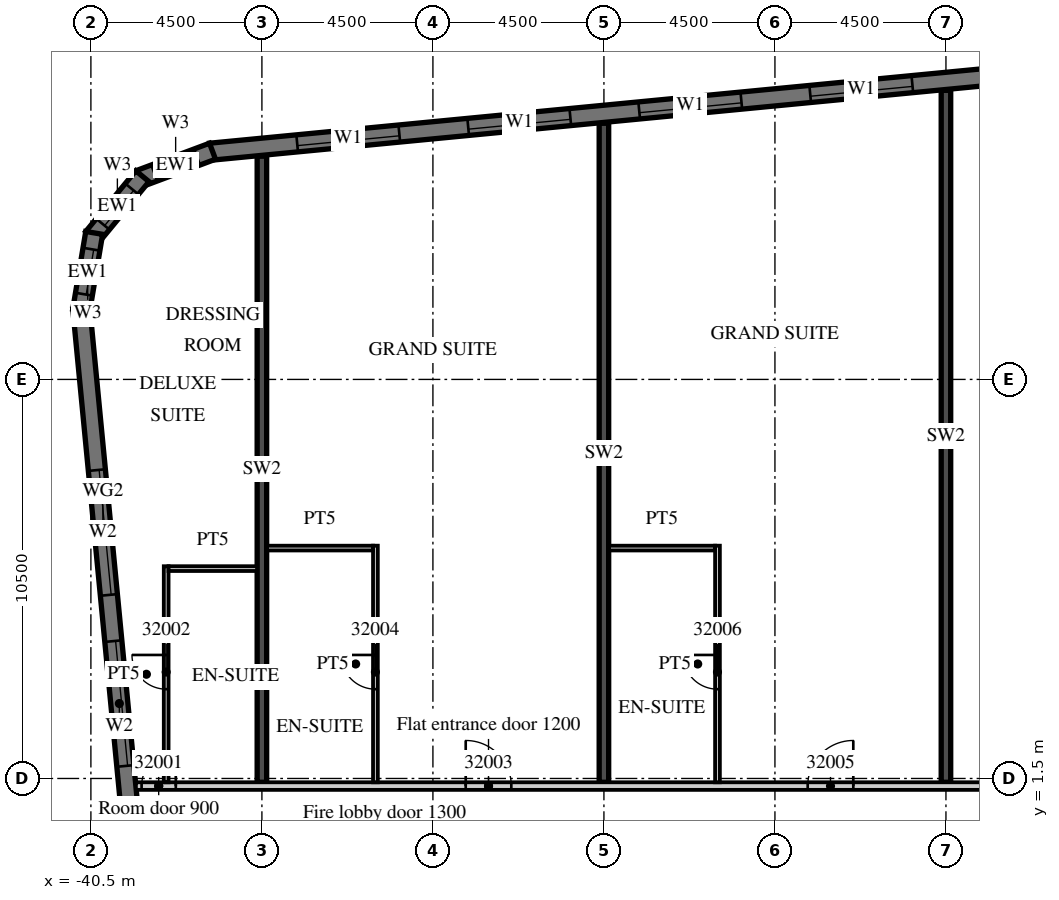
"""IFC4 building model, lengths in metres.
Left out: names, types, materials, properties, quantities, classifications, styles, units other than length and angle.
Written with IfcOpenShell. Run it as: python <this file> out.ifc"""

import sys

from ifc_helpers import new_model, si_unit, direction, frame, frame_2d, origin, place, context, subcontext, project, spatial, polyline, rectangle, outline, extrude, element, fill, save


model = new_model("IFC4")
c1 = context("Model", 3, precision=1e-05, world=origin(), true_north=direction((0.0, 1.0)))
c2 = subcontext(c1, "Body", "Model", "MODEL_VIEW")
j1 = project(units=[si_unit("LENGTHUNIT", "METRE"), si_unit("PLANEANGLEUNIT", "RADIAN")], contexts=[c1])
p1 = place(None, origin())
s1 = spatial("IfcSite", under=j1, at=p1, CompositionType="ELEMENT")
p2 = place(p1, origin())
s2 = spatial("IfcBuilding", under=s1, at=p2, CompositionType="ELEMENT")
p3 = place(p2, frame((0.0, 0.0, 140.5)))
s3 = spatial("IfcBuildingStorey", under=s2, at=p3, CompositionType="ELEMENT", Elevation=140.5)
p4 = place(p3, frame((-36.0, 1.4, 0.0), z_axis=(0.0, 0.0, 1.0), x_axis=(0.0, 1.0, 0.0)))
e1 = element("IfcWall", 1, at=p4, inside=s3, PredefinedType="SHEAR", context=c2, shape_type="SweptSolid", body=[
    extrude(rectangle(XDim=16.474, YDim=0.25, at=frame_2d((8.237, 0.0))), origin(), (0.0, 0.0, 1.0), 3.3),
])
p5 = place(p3, frame((-27.0, 1.4, 0.0), z_axis=(0.0, 0.0, 1.0), x_axis=(0.0, 1.0, 0.0)))
e2 = element("IfcWall", 2, at=p5, inside=s3, PredefinedType="SHEAR", context=c2, shape_type="SweptSolid", body=[
    extrude(rectangle(XDim=17.34, YDim=0.25, at=frame_2d((8.67, 0.0))), origin(), (0.0, 0.0, 1.0), 3.3),
])
p6 = place(p3, frame((-18.0, 1.4, 0.0), z_axis=(0.0, 0.0, 1.0), x_axis=(0.0, 1.0, 0.0)))
e3 = element("IfcWall", 3, at=p6, inside=s3, PredefinedType="SHEAR", context=c2, shape_type="SweptSolid", body=[
    extrude(rectangle(XDim=18.207, YDim=0.25, at=frame_2d((9.104, 0.0))), origin(), (0.0, 0.0, 1.0), 3.3),
])
p7 = place(p3, frame((-40.753, 13.872, 0.0), z_axis=(0.0, 0.0, 1.0), x_axis=(0.095843327381, -0.995396431878, 0.0)))
e4 = element("IfcWall", 4, at=p7, inside=s3, PredefinedType="SOLIDWALL", context=c2, shape_type="SweptSolid", body=[
    extrude(rectangle(XDim=35.0, YDim=0.45, at=frame_2d((17.5, 0.0))), origin(), (0.0, 0.0, 1.0), 3.02),
])
p8 = place(p7, frame((4.277, 0.0, 0.45)))
e5 = element("IfcOpeningElement", 5, at=p8, cuts=e4, PredefinedType="OPENING", context=c2, shape_type="SweptSolid", body=[
    extrude(rectangle(XDim=3.3, YDim=2.25, at=frame_2d((1.65, 1.125))), frame((0.0, 0.235, 0.0), z_axis=(0.0, -1.0, 0.0), x_axis=(1.0, 0.0, 0.0)), (0.0, 0.0, 1.0), 0.47),
])
p9 = place(p7, frame((8.798, 0.0, 0.45)))
e6 = element("IfcOpeningElement", 6, at=p9, cuts=e4, PredefinedType="OPENING", context=c2, shape_type="SweptSolid", body=[
    extrude(rectangle(XDim=3.3, YDim=2.25, at=frame_2d((1.65, 1.125))), frame((0.0, 0.235, 0.0), z_axis=(0.0, -1.0, 0.0), x_axis=(1.0, 0.0, 0.0)), (0.0, 0.0, 1.0), 0.47),
])
p10 = place(p3, frame((13.521, 22.89, 0.0), z_axis=(0.0, 0.0, 1.0), x_axis=(-0.995396445054, -0.095843190545, 0.0)))
e7 = element("IfcWall", 7, at=p10, inside=s3, PredefinedType="SOLIDWALL", context=c2, shape_type="SweptSolid", body=[
    extrude(rectangle(XDim=51.114, YDim=0.45, at=frame_2d((25.557, 0.0))), origin(), (0.0, 0.0, 1.0), 3.02),
])
p11 = place(p10, frame((0.91, 0.0, 0.45)))
e8 = element("IfcOpeningElement", 8, at=p11, cuts=e7, PredefinedType="OPENING", context=c2, shape_type="SweptSolid", body=[
    extrude(rectangle(XDim=2.7, YDim=2.25, at=frame_2d((1.35, 1.125))), frame((0.0, 0.235, 0.0), z_axis=(0.0, -1.0, 0.0), x_axis=(1.0, 0.0, 0.0)), (0.0, 0.0, 1.0), 0.47),
])
p12 = place(p10, frame((5.431, 0.0, 0.45)))
e9 = element("IfcOpeningElement", 9, at=p12, cuts=e7, PredefinedType="OPENING", context=c2, shape_type="SweptSolid", body=[
    extrude(rectangle(XDim=2.7, YDim=2.25, at=frame_2d((1.35, 1.125))), frame((0.0, 0.235, 0.0), z_axis=(0.0, -1.0, 0.0), x_axis=(1.0, 0.0, 0.0)), (0.0, 0.0, 1.0), 0.47),
])
p13 = place(p10, frame((9.952, 0.0, 0.45)))
e10 = element("IfcOpeningElement", 10, at=p13, cuts=e7, PredefinedType="OPENING", context=c2, shape_type="SweptSolid", body=[
    extrude(rectangle(XDim=2.7, YDim=2.25, at=frame_2d((1.35, 1.125))), frame((0.0, 0.235, 0.0), z_axis=(0.0, -1.0, 0.0), x_axis=(1.0, 0.0, 0.0)), (0.0, 0.0, 1.0), 0.47),
])
p14 = place(p10, frame((14.473, 0.0, 0.45)))
e11 = element("IfcOpeningElement", 11, at=p14, cuts=e7, PredefinedType="OPENING", context=c2, shape_type="SweptSolid", body=[
    extrude(rectangle(XDim=2.7, YDim=2.25, at=frame_2d((1.35, 1.125))), frame((0.0, 0.235, 0.0), z_axis=(0.0, -1.0, 0.0), x_axis=(1.0, 0.0, 0.0)), (0.0, 0.0, 1.0), 0.47),
])
p15 = place(p10, frame((18.994, 0.0, 0.45)))
e12 = element("IfcOpeningElement", 12, at=p15, cuts=e7, PredefinedType="OPENING", context=c2, shape_type="SweptSolid", body=[
    extrude(rectangle(XDim=2.7, YDim=2.25, at=frame_2d((1.35, 1.125))), frame((0.0, 0.235, 0.0), z_axis=(0.0, -1.0, 0.0), x_axis=(1.0, 0.0, 0.0)), (0.0, 0.0, 1.0), 0.47),
])
p16 = place(p10, frame((23.514, 0.0, 0.45)))
e13 = element("IfcOpeningElement", 13, at=p16, cuts=e7, PredefinedType="OPENING", context=c2, shape_type="SweptSolid", body=[
    extrude(rectangle(XDim=2.7, YDim=2.25, at=frame_2d((1.35, 1.125))), frame((0.0, 0.235, 0.0), z_axis=(0.0, -1.0, 0.0), x_axis=(1.0, 0.0, 0.0)), (0.0, 0.0, 1.0), 0.47),
])
p17 = place(p10, frame((28.035, 0.0, 0.45)))
e14 = element("IfcOpeningElement", 14, at=p17, cuts=e7, PredefinedType="OPENING", context=c2, shape_type="SweptSolid", body=[
    extrude(rectangle(XDim=2.7, YDim=2.25, at=frame_2d((1.35, 1.125))), frame((0.0, 0.235, 0.0), z_axis=(0.0, -1.0, 0.0), x_axis=(1.0, 0.0, 0.0)), (0.0, 0.0, 1.0), 0.47),
])
p18 = place(p10, frame((32.556, 0.0, 0.45)))
e15 = element("IfcOpeningElement", 15, at=p18, cuts=e7, PredefinedType="OPENING", context=c2, shape_type="SweptSolid", body=[
    extrude(rectangle(XDim=2.7, YDim=2.25, at=frame_2d((1.35, 1.125))), frame((0.0, 0.235, 0.0), z_axis=(0.0, -1.0, 0.0), x_axis=(1.0, 0.0, 0.0)), (0.0, 0.0, 1.0), 0.47),
])
p19 = place(p10, frame((37.077, 0.0, 0.45)))
e16 = element("IfcOpeningElement", 16, at=p19, cuts=e7, PredefinedType="OPENING", context=c2, shape_type="SweptSolid", body=[
    extrude(rectangle(XDim=2.7, YDim=2.25, at=frame_2d((1.35, 1.125))), frame((0.0, 0.235, 0.0), z_axis=(0.0, -1.0, 0.0), x_axis=(1.0, 0.0, 0.0)), (0.0, 0.0, 1.0), 0.47),
])
p20 = place(p10, frame((41.598, 0.0, 0.45)))
e17 = element("IfcOpeningElement", 17, at=p20, cuts=e7, PredefinedType="OPENING", context=c2, shape_type="SweptSolid", body=[
    extrude(rectangle(XDim=2.7, YDim=2.25, at=frame_2d((1.35, 1.125))), frame((0.0, 0.235, 0.0), z_axis=(0.0, -1.0, 0.0), x_axis=(1.0, 0.0, 0.0)), (0.0, 0.0, 1.0), 0.47),
])
p21 = place(p10, frame((46.118, 0.0, 0.45)))
e18 = element("IfcOpeningElement", 18, at=p21, cuts=e7, PredefinedType="OPENING", context=c2, shape_type="SweptSolid", body=[
    extrude(rectangle(XDim=2.7, YDim=2.25, at=frame_2d((1.35, 1.125))), frame((0.0, 0.235, 0.0), z_axis=(0.0, -1.0, 0.0), x_axis=(1.0, 0.0, 0.0)), (0.0, 0.0, 1.0), 0.47),
])
p22 = place(p3, frame((-37.3, 18.004, 0.0), z_axis=(0.0, 0.0, 1.0), x_axis=(-0.936677599948, -0.350192909346, 0.0)))
e19 = element("IfcWall", 19, at=p22, inside=s3, PredefinedType="SOLIDWALL", context=c2, shape_type="SweptSolid", body=[
    extrude(outline(polyline([(0.0, -0.225), (2.071, -0.225), (1.95, 0.225), (0.121, 0.225), (0.0, -0.225)])), origin(), (0.0, 0.0, 1.0), 3.02),
])
p23 = place(p22, frame((0.435, 0.0, 0.45)))
e20 = element("IfcOpeningElement", 20, at=p23, cuts=e19, PredefinedType="OPENING", context=c2, shape_type="SweptSolid", body=[
    extrude(rectangle(XDim=1.2, YDim=2.25, at=frame_2d((0.6, 1.125))), frame((0.0, 0.235, 0.0), z_axis=(0.0, -1.0, 0.0), x_axis=(1.0, 0.0, 0.0)), (0.0, 0.0, 1.0), 0.47),
])
p24 = place(p3, frame((-39.145, 17.347, 0.0), z_axis=(0.0, 0.0, 1.0), x_axis=(-0.636046112757, -0.771651049663, 0.0)))
e21 = element("IfcWall", 21, at=p24, inside=s3, PredefinedType="SOLIDWALL", context=c2, shape_type="SweptSolid", body=[
    extrude(outline(polyline([(0.0, -0.225), (2.071, -0.225), (1.95, 0.225), (0.121, 0.225), (0.0, -0.225)])), origin(), (0.0, 0.0, 1.0), 3.02),
])
p25 = place(p24, frame((0.435, 0.0, 0.45)))
e22 = element("IfcOpeningElement", 22, at=p25, cuts=e21, PredefinedType="OPENING", context=c2, shape_type="SweptSolid", body=[
    extrude(rectangle(XDim=1.2, YDim=2.25, at=frame_2d((0.6, 1.125))), frame((0.0, 0.235, 0.0), z_axis=(0.0, -1.0, 0.0), x_axis=(1.0, 0.0, 0.0)), (0.0, 0.0, 1.0), 0.47),
])
p26 = place(p3, frame((-40.413, 15.855, 0.0), z_axis=(0.0, 0.0, 1.0), x_axis=(-0.165068144653, -0.986282164302, 0.0)))
e23 = element("IfcWall", 23, at=p26, inside=s3, PredefinedType="SOLIDWALL", context=c2, shape_type="SweptSolid", body=[
    extrude(outline(polyline([(0.0, -0.225), (2.071, -0.225), (1.95, 0.225), (0.121, 0.225), (0.0, -0.225)])), origin(), (0.0, 0.0, 1.0), 3.02),
])
p27 = place(p26, frame((0.435, 0.0, 0.45)))
e24 = element("IfcOpeningElement", 24, at=p27, cuts=e23, PredefinedType="OPENING", context=c2, shape_type="SweptSolid", body=[
    extrude(rectangle(XDim=1.2, YDim=2.25, at=frame_2d((0.6, 1.125))), frame((0.0, 0.235, 0.0), z_axis=(0.0, -1.0, 0.0), x_axis=(1.0, 0.0, 0.0)), (0.0, 0.0, 1.0), 0.47),
])
p28 = place(p3, frame((-39.316, 1.3, 0.0), z_axis=(0.0, 0.0, 1.0), x_axis=(1.0, 0.0, 0.0)))
e25 = element("IfcWall", 25, at=p28, inside=s3, PredefinedType="PARTITIONING", context=c2, shape_type="SweptSolid", body=[
    extrude(rectangle(XDim=52.816, YDim=0.2, at=frame_2d((26.408, 0.0))), origin(), (0.0, 0.0, 1.0), 3.02),
])
p29 = place(p28, frame((0.15, 0.0, 0.0)))
e26 = element("IfcOpeningElement", 26, at=p29, cuts=e25, PredefinedType="OPENING", context=c2, shape_type="SweptSolid", body=[
    extrude(rectangle(XDim=0.9, YDim=2.1, at=frame_2d((0.45, 1.05))), frame((0.0, 0.11, 0.0), z_axis=(0.0, -1.0, 0.0), x_axis=(1.0, 0.0, 0.0)), (0.0, 0.0, 1.0), 0.22),
])
p30 = place(p28, frame((8.679, 0.0, 0.0)))
e27 = element("IfcOpeningElement", 27, at=p30, cuts=e25, PredefinedType="OPENING", context=c2, shape_type="SweptSolid", body=[
    extrude(rectangle(XDim=1.2, YDim=2.1, at=frame_2d((0.6, 1.05))), frame((0.0, 0.11, 0.0), z_axis=(0.0, -1.0, 0.0), x_axis=(1.0, 0.0, 0.0)), (0.0, 0.0, 1.0), 0.22),
])
p31 = place(p28, frame((17.678, 0.0, 0.0)))
e28 = element("IfcOpeningElement", 28, at=p31, cuts=e25, PredefinedType="OPENING", context=c2, shape_type="SweptSolid", body=[
    extrude(rectangle(XDim=1.2, YDim=2.1, at=frame_2d((0.6, 1.05))), frame((0.0, 0.11, 0.0), z_axis=(0.0, -1.0, 0.0), x_axis=(1.0, 0.0, 0.0)), (0.0, 0.0, 1.0), 0.22),
])
p32 = place(p28, frame((23.754, 0.0, 0.0)))
e29 = element("IfcOpeningElement", 29, at=p32, cuts=e25, PredefinedType="OPENING", context=c2, shape_type="SweptSolid", body=[
    extrude(rectangle(XDim=1.2, YDim=2.1, at=frame_2d((0.6, 1.05))), frame((0.0, 0.11, 0.0), z_axis=(0.0, -1.0, 0.0), x_axis=(1.0, 0.0, 0.0)), (0.0, 0.0, 1.0), 0.22),
])
p33 = place(p28, frame((30.891, 0.0, 0.0)))
e30 = element("IfcOpeningElement", 30, at=p33, cuts=e25, PredefinedType="OPENING", context=c2, shape_type="SweptSolid", body=[
    extrude(rectangle(XDim=1.0, YDim=2.1, at=frame_2d((0.5, 1.05))), frame((0.0, 0.11, 0.0), z_axis=(0.0, -1.0, 0.0), x_axis=(1.0, 0.0, 0.0)), (0.0, 0.0, 1.0), 0.22),
])
p34 = place(p28, frame((37.741, 0.0, 0.0)))
e31 = element("IfcOpeningElement", 31, at=p34, cuts=e25, PredefinedType="OPENING", context=c2, shape_type="SweptSolid", body=[
    extrude(rectangle(XDim=1.0, YDim=2.1, at=frame_2d((0.5, 1.05))), frame((0.0, 0.11, 0.0), z_axis=(0.0, -1.0, 0.0), x_axis=(1.0, 0.0, 0.0)), (0.0, 0.0, 1.0), 0.22),
])
p35 = place(p28, frame((41.754, 0.0, 0.0)))
e32 = element("IfcOpeningElement", 32, at=p35, cuts=e25, PredefinedType="OPENING", context=c2, shape_type="SweptSolid", body=[
    extrude(rectangle(XDim=1.2, YDim=2.1, at=frame_2d((0.6, 1.05))), frame((0.0, 0.11, 0.0), z_axis=(0.0, -1.0, 0.0), x_axis=(1.0, 0.0, 0.0)), (0.0, 0.0, 1.0), 0.22),
])
p36 = place(p28, frame((48.891, 0.0, 0.0)))
e33 = element("IfcOpeningElement", 33, at=p36, cuts=e25, PredefinedType="OPENING", context=c2, shape_type="SweptSolid", body=[
    extrude(rectangle(XDim=1.0, YDim=2.1, at=frame_2d((0.5, 1.05))), frame((0.0, 0.11, 0.0), z_axis=(0.0, -1.0, 0.0), x_axis=(1.0, 0.0, 0.0)), (0.0, 0.0, 1.0), 0.22),
])
p37 = place(p3, frame((-38.519, 1.4, 0.0), z_axis=(0.0, 0.0, 1.0), x_axis=(0.0, 1.0, 0.0)))
e34 = element("IfcWall", 34, at=p37, inside=s3, PredefinedType="PARTITIONING", context=c2, shape_type="SweptSolid", body=[
    extrude(rectangle(XDim=5.684, YDim=0.125, at=frame_2d((2.842, 0.0))), origin(), (0.0, 0.0, 1.0), 3.02),
])
p38 = place(p37, frame((2.45, 0.0, 0.0)))
e35 = element("IfcOpeningElement", 35, at=p38, cuts=e34, PredefinedType="OPENING", context=c2, shape_type="SweptSolid", body=[
    extrude(rectangle(XDim=0.9, YDim=2.1, at=frame_2d((0.45, 1.05))), frame((0.0, 0.073, 0.0), z_axis=(0.0, -1.0, 0.0), x_axis=(1.0, 0.0, 0.0)), (0.0, 0.0, 1.0), 0.145),
])
p39 = place(p3, frame((-38.457, 7.022, 0.0), z_axis=(0.0, 0.0, 1.0), x_axis=(1.0, 0.0, 0.0)))
e36 = element("IfcWall", 36, at=p39, inside=s3, PredefinedType="PARTITIONING", context=c2, shape_type="SweptSolid", body=[
    extrude(rectangle(XDim=2.332, YDim=0.125, at=frame_2d((1.166, 0.0))), origin(), (0.0, 0.0, 1.0), 3.02),
])
p40 = place(p3, frame((-33.013, 1.4, 0.0), z_axis=(0.0, 0.0, 1.0), x_axis=(0.0, 1.0, 0.0)))
e37 = element("IfcWall", 37, at=p40, inside=s3, PredefinedType="PARTITIONING", context=c2, shape_type="SweptSolid", body=[
    extrude(rectangle(XDim=6.225, YDim=0.125, at=frame_2d((3.113, 0.0))), origin(), (0.0, 0.0, 1.0), 3.02),
])
p41 = place(p40, frame((2.45, 0.0, 0.0)))
e38 = element("IfcOpeningElement", 38, at=p41, cuts=e37, PredefinedType="OPENING", context=c2, shape_type="SweptSolid", body=[
    extrude(rectangle(XDim=0.9, YDim=2.1, at=frame_2d((0.45, 1.05))), frame((0.0, 0.073, 0.0), z_axis=(0.0, -1.0, 0.0), x_axis=(1.0, 0.0, 0.0)), (0.0, 0.0, 1.0), 0.145),
])
p42 = place(p3, frame((-35.875, 7.562, 0.0), z_axis=(0.0, 0.0, 1.0), x_axis=(1.0, 0.0, 0.0)))
e39 = element("IfcWall", 39, at=p42, inside=s3, PredefinedType="PARTITIONING", context=c2, shape_type="SweptSolid", body=[
    extrude(rectangle(XDim=2.8, YDim=0.125, at=frame_2d((1.4, 0.0))), origin(), (0.0, 0.0, 1.0), 3.02),
])
p43 = place(p3, frame((-24.012, 1.4, 0.0), z_axis=(0.0, 0.0, 1.0), x_axis=(0.0, 1.0, 0.0)))
e40 = element("IfcWall", 40, at=p43, inside=s3, PredefinedType="PARTITIONING", context=c2, shape_type="SweptSolid", body=[
    extrude(rectangle(XDim=6.225, YDim=0.125, at=frame_2d((3.113, 0.0))), origin(), (0.0, 0.0, 1.0), 3.02),
])
p44 = place(p43, frame((2.45, 0.0, 0.0)))
e41 = element("IfcOpeningElement", 41, at=p44, cuts=e40, PredefinedType="OPENING", context=c2, shape_type="SweptSolid", body=[
    extrude(rectangle(XDim=0.9, YDim=2.1, at=frame_2d((0.45, 1.05))), frame((0.0, 0.073, 0.0), z_axis=(0.0, -1.0, 0.0), x_axis=(1.0, 0.0, 0.0)), (0.0, 0.0, 1.0), 0.145),
])
p45 = place(p3, frame((-26.875, 7.562, 0.0), z_axis=(0.0, 0.0, 1.0), x_axis=(1.0, 0.0, 0.0)))
e42 = element("IfcWall", 42, at=p45, inside=s3, PredefinedType="PARTITIONING", context=c2, shape_type="SweptSolid", body=[
    extrude(rectangle(XDim=2.8, YDim=0.125, at=frame_2d((1.4, 0.0))), origin(), (0.0, 0.0, 1.0), 3.02),
])
p46 = place(p8, origin())
e43 = element("IfcWindow", 43, at=p46, inside=s3, PartitioningType="SINGLE_PANEL", PredefinedType="WINDOW", context=c2, shape_type="SweptSolid", body=[
    extrude(rectangle(XDim=3.3, YDim=2.25, at=frame_2d((1.65, 1.125))), frame((0.0, 0.09, 0.0), z_axis=(0.0, -1.0, 0.0), x_axis=(1.0, 0.0, 0.0)), (0.0, 0.0, 1.0), 0.06),
])
fill(e5, e43)
p47 = place(p9, origin())
e44 = element("IfcWindow", 44, at=p47, inside=s3, PartitioningType="SINGLE_PANEL", PredefinedType="WINDOW", context=c2, shape_type="SweptSolid", body=[
    extrude(rectangle(XDim=3.3, YDim=2.25, at=frame_2d((1.65, 1.125))), frame((0.0, 0.09, 0.0), z_axis=(0.0, -1.0, 0.0), x_axis=(1.0, 0.0, 0.0)), (0.0, 0.0, 1.0), 0.06),
])
fill(e6, e44)
p48 = place(p18, origin())
e45 = element("IfcWindow", 45, at=p48, inside=s3, PartitioningType="SINGLE_PANEL", PredefinedType="WINDOW", context=c2, shape_type="SweptSolid", body=[
    extrude(rectangle(XDim=2.7, YDim=2.25, at=frame_2d((1.35, 1.125))), frame((0.0, 0.09, 0.0), z_axis=(0.0, -1.0, 0.0), x_axis=(1.0, 0.0, 0.0)), (0.0, 0.0, 1.0), 0.06),
])
fill(e15, e45)
p49 = place(p19, origin())
e46 = element("IfcWindow", 46, at=p49, inside=s3, PartitioningType="SINGLE_PANEL", PredefinedType="WINDOW", context=c2, shape_type="SweptSolid", body=[
    extrude(rectangle(XDim=2.7, YDim=2.25, at=frame_2d((1.35, 1.125))), frame((0.0, 0.09, 0.0), z_axis=(0.0, -1.0, 0.0), x_axis=(1.0, 0.0, 0.0)), (0.0, 0.0, 1.0), 0.06),
])
fill(e16, e46)
p50 = place(p20, origin())
e47 = element("IfcWindow", 47, at=p50, inside=s3, PartitioningType="SINGLE_PANEL", PredefinedType="WINDOW", context=c2, shape_type="SweptSolid", body=[
    extrude(rectangle(XDim=2.7, YDim=2.25, at=frame_2d((1.35, 1.125))), frame((0.0, 0.09, 0.0), z_axis=(0.0, -1.0, 0.0), x_axis=(1.0, 0.0, 0.0)), (0.0, 0.0, 1.0), 0.06),
])
fill(e17, e47)
p51 = place(p21, origin())
e48 = element("IfcWindow", 48, at=p51, inside=s3, PartitioningType="SINGLE_PANEL", PredefinedType="WINDOW", context=c2, shape_type="SweptSolid", body=[
    extrude(rectangle(XDim=2.7, YDim=2.25, at=frame_2d((1.35, 1.125))), frame((0.0, 0.09, 0.0), z_axis=(0.0, -1.0, 0.0), x_axis=(1.0, 0.0, 0.0)), (0.0, 0.0, 1.0), 0.06),
])
fill(e18, e48)
p52 = place(p23, origin())
e49 = element("IfcWindow", 49, at=p52, inside=s3, PartitioningType="SINGLE_PANEL", PredefinedType="WINDOW", context=c2, shape_type="SweptSolid", body=[
    extrude(rectangle(XDim=1.2, YDim=2.25, at=frame_2d((0.6, 1.125))), frame((0.0, 0.09, 0.0), z_axis=(0.0, -1.0, 0.0), x_axis=(1.0, 0.0, 0.0)), (0.0, 0.0, 1.0), 0.06),
])
fill(e20, e49)
p53 = place(p25, origin())
e50 = element("IfcWindow", 50, at=p53, inside=s3, PartitioningType="SINGLE_PANEL", PredefinedType="WINDOW", context=c2, shape_type="SweptSolid", body=[
    extrude(rectangle(XDim=1.2, YDim=2.25, at=frame_2d((0.6, 1.125))), frame((0.0, 0.09, 0.0), z_axis=(0.0, -1.0, 0.0), x_axis=(1.0, 0.0, 0.0)), (0.0, 0.0, 1.0), 0.06),
])
fill(e22, e50)
p54 = place(p27, origin())
e51 = element("IfcWindow", 51, at=p54, inside=s3, PartitioningType="SINGLE_PANEL", PredefinedType="WINDOW", context=c2, shape_type="SweptSolid", body=[
    extrude(rectangle(XDim=1.2, YDim=2.25, at=frame_2d((0.6, 1.125))), frame((0.0, 0.09, 0.0), z_axis=(0.0, -1.0, 0.0), x_axis=(1.0, 0.0, 0.0)), (0.0, 0.0, 1.0), 0.06),
])
fill(e24, e51)
p55 = place(p29, origin())
e52 = element("IfcDoor", 52, at=p55, inside=s3, OperationType="SINGLE_SWING_RIGHT", PredefinedType="DOOR", context=c2, shape_type="SweptSolid", body=[
    extrude(rectangle(XDim=0.9, YDim=2.1, at=frame_2d((0.45, 1.05))), frame((0.0, 0.025, 0.0), z_axis=(0.0, -1.0, 0.0), x_axis=(1.0, 0.0, 0.0)), (0.0, 0.0, 1.0), 0.05),
])
fill(e26, e52)
p56 = place(p38, origin())
e53 = element("IfcDoor", 53, at=p56, inside=s3, OperationType="SINGLE_SWING_RIGHT", PredefinedType="DOOR", context=c2, shape_type="SweptSolid", body=[
    extrude(rectangle(XDim=0.9, YDim=2.1, at=frame_2d((0.45, 1.05))), frame((0.0, 0.025, 0.0), z_axis=(0.0, -1.0, 0.0), x_axis=(1.0, 0.0, 0.0)), (0.0, 0.0, 1.0), 0.05),
])
fill(e35, e53)
p57 = place(p30, origin())
e54 = element("IfcDoor", 54, at=p57, inside=s3, OperationType="SINGLE_SWING_LEFT", PredefinedType="DOOR", context=c2, shape_type="SweptSolid", body=[
    extrude(rectangle(XDim=1.2, YDim=2.1, at=frame_2d((0.6, 1.05))), frame((0.0, 0.025, 0.0), z_axis=(0.0, -1.0, 0.0), x_axis=(1.0, 0.0, 0.0)), (0.0, 0.0, 1.0), 0.05),
])
fill(e27, e54)
p58 = place(p41, origin())
e55 = element("IfcDoor", 55, at=p58, inside=s3, OperationType="SINGLE_SWING_RIGHT", PredefinedType="DOOR", context=c2, shape_type="SweptSolid", body=[
    extrude(rectangle(XDim=0.9, YDim=2.1, at=frame_2d((0.45, 1.05))), frame((0.0, 0.025, 0.0), z_axis=(0.0, -1.0, 0.0), x_axis=(1.0, 0.0, 0.0)), (0.0, 0.0, 1.0), 0.05),
])
fill(e38, e55)
p59 = place(p31, origin())
e56 = element("IfcDoor", 56, at=p59, inside=s3, OperationType="SINGLE_SWING_RIGHT", PredefinedType="DOOR", context=c2, shape_type="SweptSolid", body=[
    extrude(rectangle(XDim=1.2, YDim=2.1, at=frame_2d((0.6, 1.05))), frame((0.0, 0.025, 0.0), z_axis=(0.0, -1.0, 0.0), x_axis=(1.0, 0.0, 0.0)), (0.0, 0.0, 1.0), 0.05),
])
fill(e28, e56)
p60 = place(p44, origin())
e57 = element("IfcDoor", 57, at=p60, inside=s3, OperationType="SINGLE_SWING_RIGHT", PredefinedType="DOOR", context=c2, shape_type="SweptSolid", body=[
    extrude(rectangle(XDim=0.9, YDim=2.1, at=frame_2d((0.45, 1.05))), frame((0.0, 0.025, 0.0), z_axis=(0.0, -1.0, 0.0), x_axis=(1.0, 0.0, 0.0)), (0.0, 0.0, 1.0), 0.05),
])
fill(e41, e57)
save(model, sys.argv[1])
